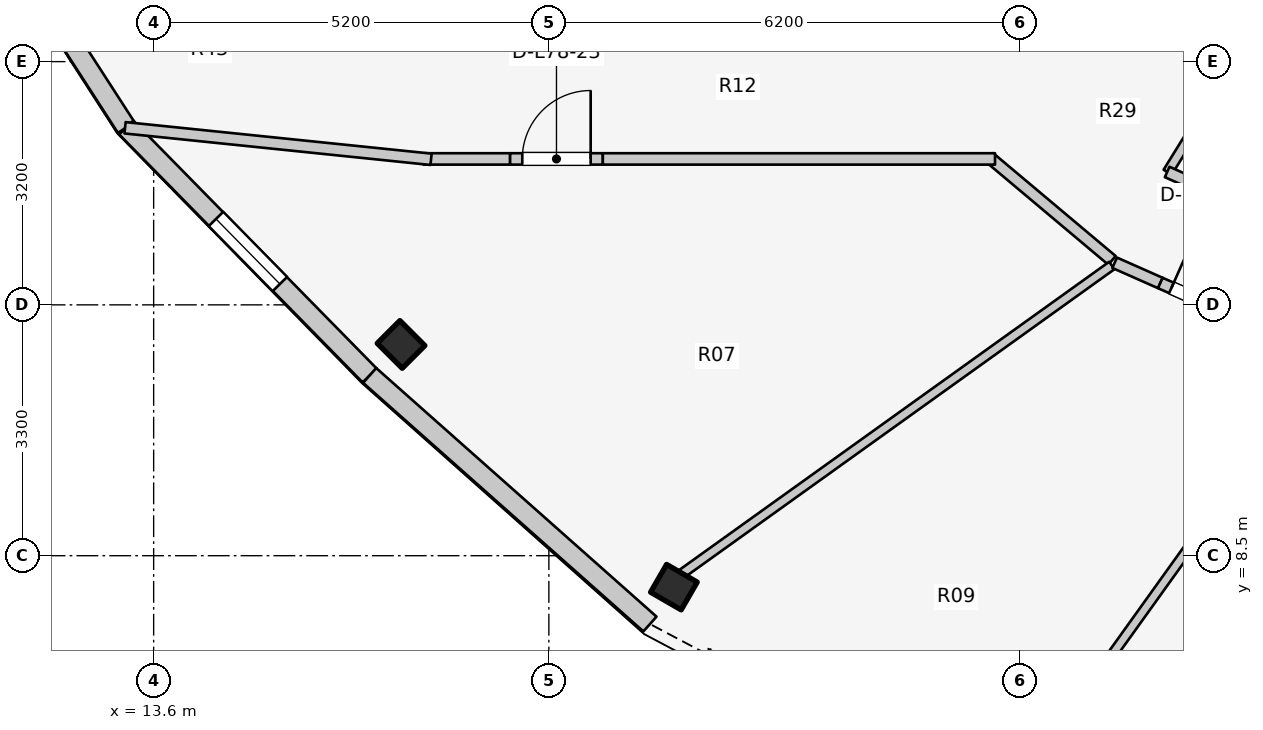
"""IFC4 building model, lengths in metres.
Left out: names, types, materials, properties, quantities, classifications, styles, units other than length and angle.
Written with IfcOpenShell. Run it as: python <this file> out.ifc"""

import sys

from ifc_helpers import new_model, si_unit, direction, frame, frame_2d, origin, origin_2d, place, context, subcontext, project, spatial, rectangle, i_section, extrude, element, fill, save


model = new_model("IFC4")
c1 = context("Model", 3, precision=1e-05, world=origin(), true_north=direction((0.0, 1.0)))
c2 = subcontext(c1, "Body", "Model", "MODEL_VIEW")
j1 = project(units=[si_unit("LENGTHUNIT", "METRE"), si_unit("PLANEANGLEUNIT", "RADIAN")], contexts=[c1])
p1 = place(None, origin())
s1 = spatial("IfcSite", under=j1, at=p1, CompositionType="ELEMENT")
p2 = place(p1, origin())
s2 = spatial("IfcBuilding", under=s1, at=p2, CompositionType="ELEMENT")
p3 = place(p2, frame((0.0, 0.0, 256.8)))
s3 = spatial("IfcBuildingStorey", under=s2, at=p3, CompositionType="ELEMENT", Elevation=256.8)
for number, where, z_axis, x_axis in (
    (1, (16.855, 11.279, 0.0), (0.0, 0.0, 1.0), (-0.707, -0.707, 0.0)),
    (2, (20.445, 8.086, 0.0), (0.0, 0.0, 1.0), (-0.5, -0.866, 0.0)),
):
    element("IfcColumn", number, at=place(p3, frame(where, z_axis=z_axis, x_axis=x_axis)), inside=s3, PredefinedType="COLUMN", context=c2, shape_type="SweptSolid", body=[
        extrude(i_section(OverallWidth=0.422, OverallDepth=0.465, WebThickness=0.045, FlangeThickness=0.073, FilletRadius=0.025, at=origin_2d()), origin(), (0.0, 0.0, 1.0), 3.6),
    ])
p4 = place(p3, frame((10.895, 17.761, 0.0), z_axis=(0.0, 0.0, 1.0), x_axis=(0.542641766008, -0.839964233634, 0.0)))
e3 = element("IfcWall", 3, at=p4, inside=s3, PredefinedType="STANDARD", context=c2, shape_type="SweptSolid", body=[
    extrude(rectangle(XDim=4.319, YDim=0.26, at=frame_2d((2.16, 0.0))), origin(), (0.0, 0.0, 1.0), 1.72),
])
p5 = place(p4, frame((1.56, 0.0, 0.15)))
e4 = element("IfcOpeningElement", 4, at=p5, cuts=e3, PredefinedType="OPENING", context=c2, shape_type="SweptSolid", body=[
    extrude(rectangle(XDim=1.2, YDim=0.9, at=frame_2d((0.6, 0.45))), frame((0.0, 0.14, 0.0), z_axis=(0.0, -1.0, 0.0), x_axis=(1.0, 0.0, 0.0)), (0.0, 0.0, 1.0), 0.28),
])
p6 = place(p3, frame((13.239, 14.133, 0.0), z_axis=(0.0, 0.0, 1.0), x_axis=(0.700642973333, -0.713512034881, 0.0)))
e5 = element("IfcWall", 5, at=p6, inside=s3, PredefinedType="STANDARD", context=c2, shape_type="SweptSolid", body=[
    extrude(rectangle(XDim=4.572, YDim=0.26, at=frame_2d((2.286, 0.0))), origin(), (0.0, 0.0, 1.0), 1.72),
])
p7 = place(p6, frame((1.686, 0.0, 0.15)))
e6 = element("IfcOpeningElement", 6, at=p7, cuts=e5, PredefinedType="OPENING", context=c2, shape_type="SweptSolid", body=[
    extrude(rectangle(XDim=1.2, YDim=0.9, at=frame_2d((0.6, 0.45))), frame((0.0, 0.14, 0.0), z_axis=(0.0, -1.0, 0.0), x_axis=(1.0, 0.0, 0.0)), (0.0, 0.0, 1.0), 0.28),
])
p8 = place(p3, frame((16.442, 10.871, 0.0), z_axis=(0.0, 0.0, 1.0), x_axis=(0.748165854006, -0.663511759428, 0.0)))
e7 = element("IfcWall", 7, at=p8, inside=s3, PredefinedType="STANDARD", context=c2, shape_type="SweptSolid", body=[
    extrude(rectangle(XDim=4.929, YDim=0.26, at=frame_2d((2.464, 0.0))), origin(), (0.0, 0.0, 1.0), 1.72),
])
p9 = place(p3, frame((28.45, 15.985, 0.0), z_axis=(0.0, 0.0, 1.0), x_axis=(-0.52592395012, -0.850531597702, 0.0)))
e8 = element("IfcWall", 8, at=p9, inside=s3, PredefinedType="PARTITIONING", context=c2, shape_type="SweptSolid", body=[
    extrude(rectangle(XDim=2.869, YDim=0.125, at=frame_2d((1.435, 0.0))), origin(), (0.0, 0.0, 1.0), 1.72),
])
p10 = place(p3, frame((26.935, 13.549, 0.0), z_axis=(0.0, 0.0, 1.0), x_axis=(0.912859324183, -0.408274239027, 0.0)))
e9 = element("IfcWall", 9, at=p10, inside=s3, PredefinedType="PARTITIONING", context=c2, shape_type="SweptSolid", body=[
    extrude(rectangle(XDim=2.682, YDim=0.15, at=frame_2d((1.341, 0.0))), origin(), (0.0, 0.0, 1.0), 1.72),
])
p11 = place(p3, frame((26.209, 12.385, 0.0), z_axis=(0.0, 0.0, 1.0), x_axis=(-0.765677451641, 0.643224719711, 0.0)))
e10 = element("IfcWall", 10, at=p11, inside=s3, PredefinedType="PARTITIONING", context=c2, shape_type="SweptSolid", body=[
    extrude(rectangle(XDim=2.105, YDim=0.15, at=frame_2d((1.053, 0.0))), origin(), (0.0, 0.0, 1.0), 1.72),
])
p12 = place(p3, frame((17.15, 13.72, 0.0), z_axis=(0.0, 0.0, 1.0), x_axis=(1.0, 0.0, 0.0)))
e11 = element("IfcWall", 11, at=p12, inside=s3, PredefinedType="PARTITIONING", context=c2, shape_type="SweptSolid", body=[
    extrude(rectangle(XDim=1.14, YDim=0.15, at=frame_2d((0.57, 0.0))), origin(), (0.0, 0.0, 1.0), 1.72),
])
p13 = place(p3, frame((18.29, 13.72, 0.0), z_axis=(0.0, 0.0, 1.0), x_axis=(1.0, 0.0, 0.0)))
e12 = element("IfcWall", 12, at=p13, inside=s3, PredefinedType="PARTITIONING", context=c2, shape_type="SweptSolid", body=[
    extrude(rectangle(XDim=1.22, YDim=0.15, at=frame_2d((0.61, 0.0))), origin(), (0.0, 0.0, 1.0), 3.075),
])
p14 = place(p13, frame((0.16, 0.0, 0.0)))
e13 = element("IfcOpeningElement", 13, at=p14, cuts=e12, PredefinedType="OPENING", context=c2, shape_type="SweptSolid", body=[
    extrude(rectangle(XDim=0.9, YDim=2.1, at=frame_2d((0.45, 1.05))), frame((0.0, 0.085, 0.0), z_axis=(0.0, -1.0, 0.0), x_axis=(1.0, 0.0, 0.0)), (0.0, 0.0, 1.0), 0.17),
])
p15 = place(p3, frame((19.51, 13.72, 0.0), z_axis=(0.0, 0.0, 1.0), x_axis=(1.0, 0.0, 0.0)))
e14 = element("IfcWall", 14, at=p15, inside=s3, PredefinedType="PARTITIONING", context=c2, shape_type="SweptSolid", body=[
    extrude(rectangle(XDim=5.16, YDim=0.15, at=frame_2d((2.58, 0.0))), origin(), (0.0, 0.0, 1.0), 1.72),
])
p16 = place(p3, frame((17.25, 13.715, 0.0), z_axis=(0.0, 0.0, 1.0), x_axis=(-0.994734711466, 0.102483431859, 0.0)))
e15 = element("IfcWall", 15, at=p16, inside=s3, PredefinedType="PARTITIONING", context=c2, shape_type="SweptSolid", body=[
    extrude(rectangle(XDim=4.047, YDim=0.15, at=frame_2d((2.024, 0.0))), origin(), (0.0, 0.0, 1.0), 1.72),
])
p17 = place(p3, frame((26.206, 12.318, 0.0), z_axis=(0.0, 0.0, 1.0), x_axis=(-0.812763742602, -0.582593424879, 0.0)))
e16 = element("IfcWall", 16, at=p17, inside=s3, PredefinedType="MOVABLE", context=c2, shape_type="SweptSolid", body=[
    extrude(rectangle(XDim=6.966, YDim=0.12, at=frame_2d((3.483, 0.0))), origin(), (0.0, 0.0, 1.0), 1.72),
])
p18 = place(p3, frame((28.992, 11.076, 0.0), z_axis=(0.0, 0.0, 1.0), x_axis=(-0.582726066442, -0.812668648029, 0.0)))
e17 = element("IfcWall", 17, at=p18, inside=s3, PredefinedType="MOVABLE", context=c2, shape_type="SweptSolid", body=[
    extrude(rectangle(XDim=6.515, YDim=0.12, at=frame_2d((3.257, 0.0))), origin(), (0.0, 0.0, 1.0), 1.72),
])
p19 = place(p3, frame((26.244, 12.354, 0.0), z_axis=(0.0, 0.0, 1.0), x_axis=(0.914255086823, -0.405139033194, 0.0)))
e18 = element("IfcWall", 18, at=p19, inside=s3, PredefinedType="PARTITIONING", context=c2, shape_type="SweptSolid", body=[
    extrude(rectangle(XDim=0.657, YDim=0.15, at=frame_2d((0.329, 0.0))), origin(), (0.0, 0.0, 1.0), 3.075),
])
p20 = place(p3, frame((26.845, 12.088, 0.0), z_axis=(0.0, 0.0, 1.0), x_axis=(0.914294474207, -0.405050138174, 0.0)))
e19 = element("IfcWall", 19, at=p20, inside=s3, PredefinedType="PARTITIONING", context=c2, shape_type="SweptSolid", body=[
    extrude(rectangle(XDim=1.27, YDim=0.15, at=frame_2d((0.635, 0.0))), origin(), (0.0, 0.0, 1.0), 2.16),
])
p21 = place(p20, frame((0.16, 0.0, 0.0)))
e20 = element("IfcOpeningElement", 20, at=p21, cuts=e19, PredefinedType="OPENING", context=c2, shape_type="SweptSolid", body=[
    extrude(rectangle(XDim=0.95, YDim=2.1, at=frame_2d((0.475, 1.05))), frame((0.0, 0.085, 0.0), z_axis=(0.0, -1.0, 0.0), x_axis=(1.0, 0.0, 0.0)), (0.0, 0.0, 1.0), 0.17),
])
p22 = place(p7, origin())
e21 = element("IfcWindow", 21, at=p22, inside=s3, PartitioningType="SINGLE_PANEL", PredefinedType="WINDOW", context=c2, shape_type="SweptSolid", body=[
    extrude(rectangle(XDim=1.2, YDim=0.9, at=frame_2d((0.6, 0.45))), frame((0.0, 0.03, 0.0), z_axis=(0.0, -1.0, 0.0), x_axis=(1.0, 0.0, 0.0)), (0.0, 0.0, 1.0), 0.06),
])
fill(e6, e21)
p23 = place(p14, origin())
e22 = element("IfcDoor", 22, at=p23, inside=s3, OperationType="SINGLE_SWING_RIGHT", PredefinedType="DOOR", context=c2, shape_type="SweptSolid", body=[
    extrude(rectangle(XDim=0.9, YDim=2.1, at=frame_2d((0.45, 1.05))), frame((0.0, 0.025, 0.0), z_axis=(0.0, -1.0, 0.0), x_axis=(1.0, 0.0, 0.0)), (0.0, 0.0, 1.0), 0.05),
])
fill(e13, e22)
p24 = place(p21, origin())
e23 = element("IfcDoor", 23, at=p24, inside=s3, OperationType="SINGLE_SWING_LEFT", PredefinedType="DOOR", context=c2, shape_type="SweptSolid", body=[
    extrude(rectangle(XDim=0.95, YDim=2.1, at=frame_2d((0.475, 1.05))), frame((0.0, 0.025, 0.0), z_axis=(0.0, -1.0, 0.0), x_axis=(1.0, 0.0, 0.0)), (0.0, 0.0, 1.0), 0.05),
])
fill(e20, e23)
save(model, sys.argv[1])
